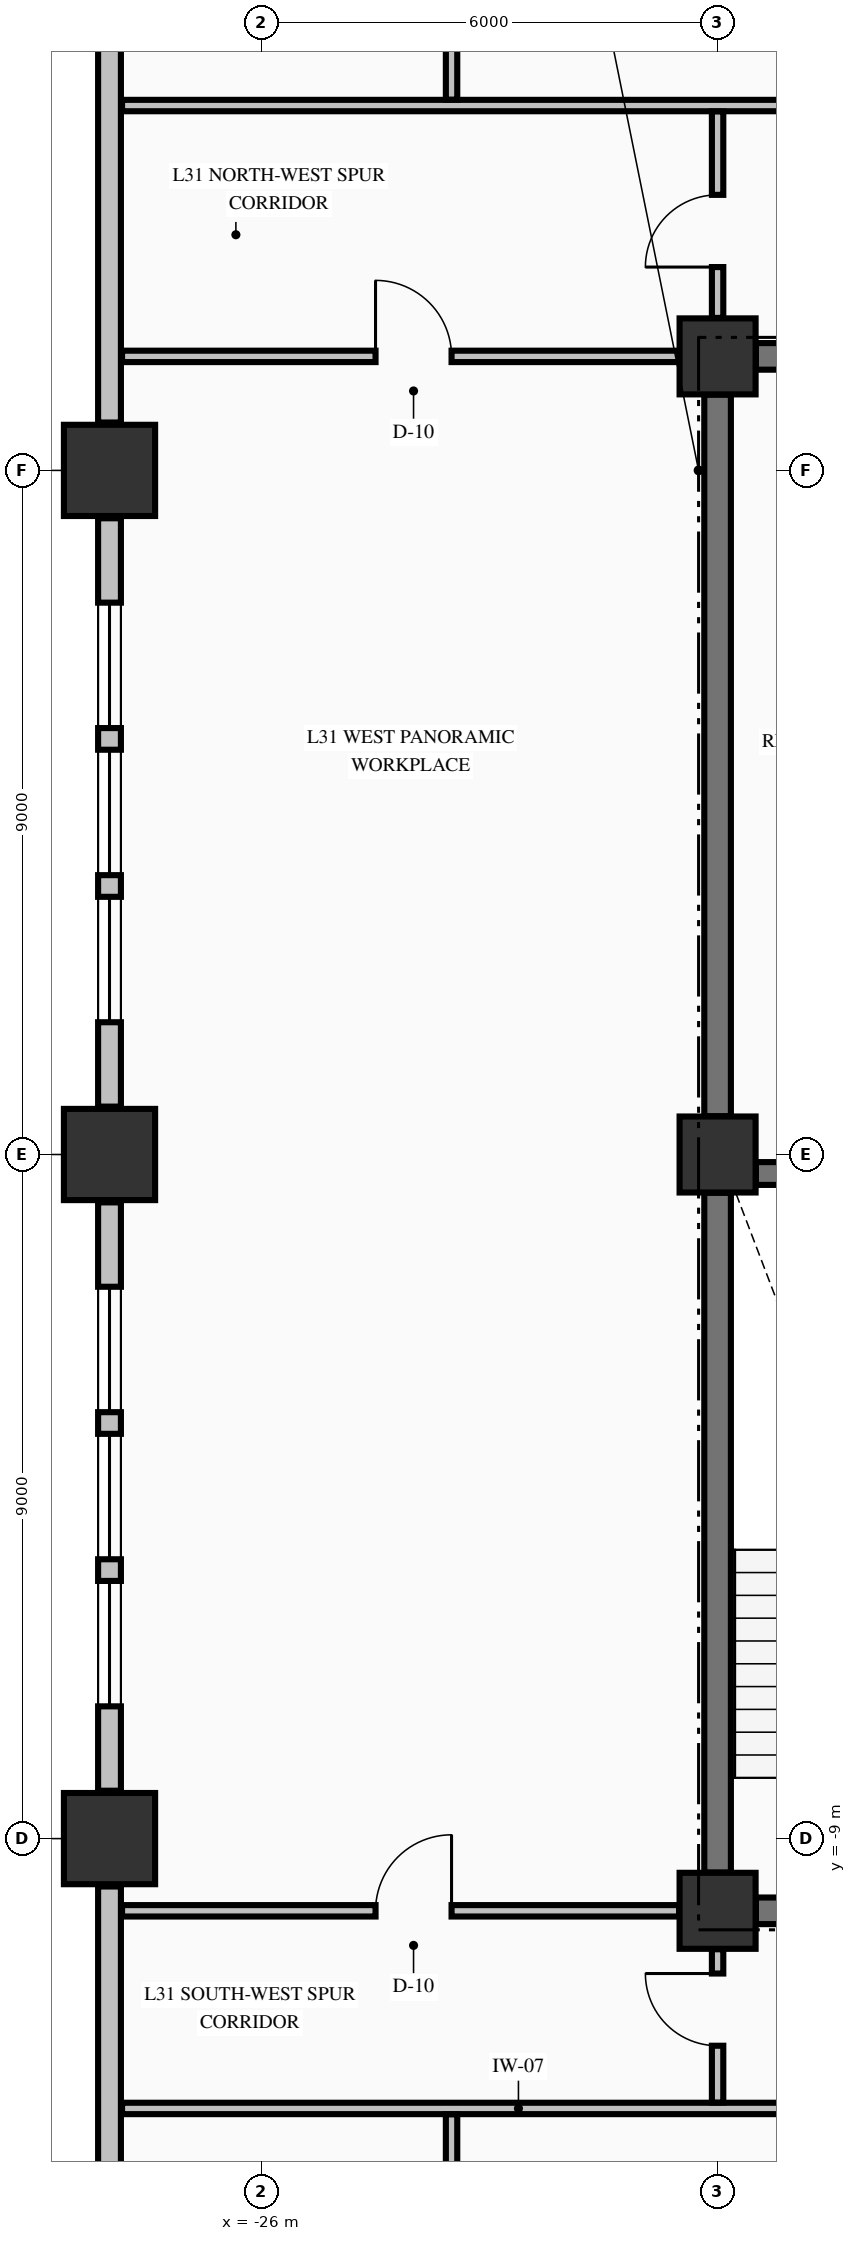
"""IFC4 building model, lengths in metres.
Left out: names, types, materials, properties, quantities, classifications, styles, units other than length and angle.
Written with IfcOpenShell. Run it as: python <this file> out.ifc"""

import sys

from ifc_helpers import new_model, si_unit, direction, frame, frame_2d, origin, origin_2d, place, context, subcontext, project, spatial, rectangle, extrude, element, fill, save


model = new_model("IFC4")
c1 = context("Model", 3, precision=1e-05, world=origin(), true_north=direction((0.0, 1.0)))
c2 = subcontext(c1, "Body", "Model", "MODEL_VIEW")
j1 = project(units=[si_unit("LENGTHUNIT", "METRE"), si_unit("PLANEANGLEUNIT", "RADIAN")], contexts=[c1])
p1 = place(None, origin())
s1 = spatial("IfcSite", under=j1, at=p1, CompositionType="ELEMENT")
p2 = place(p1, origin())
s2 = spatial("IfcBuilding", under=s1, at=p2, CompositionType="ELEMENT")
p3 = place(p2, frame((0.0, 0.0, 124.92)))
s3 = spatial("IfcBuildingStorey", under=s2, at=p3, CompositionType="ELEMENT", Elevation=124.92)
for number, where, z_axis, x_axis in (
    (1, (-28.0, -9.0, -0.25), (0.0, 0.0, 1.0), (1.0, 0.0, 0.0)),
    (2, (-28.0, 0.0, -0.25), (0.0, 0.0, 1.0), (1.0, 0.0, 0.0)),
    (3, (-28.0, 9.0, -0.25), (0.0, 0.0, 1.0), (1.0, 0.0, 0.0)),
):
    element("IfcColumn", number, at=place(p3, frame(where, z_axis=z_axis, x_axis=x_axis)), inside=s3, PredefinedType="COLUMN", context=c2, shape_type="SweptSolid", body=[
        extrude(rectangle(XDim=1.2, YDim=1.2, at=origin_2d()), origin(), (0.0, 0.0, 1.0), 3.57),
    ])
for number, where, z_axis, x_axis in (
    (4, (-20.0, -9.95, -0.25), (0.0, 0.0, 1.0), (1.0, 0.0, 0.0)),
    (5, (-20.0, 10.5, -0.25), (0.0, 0.0, 1.0), (1.0, 0.0, 0.0)),
    (6, (-20.0, 0.0, -0.25), (0.0, 0.0, 1.0), (1.0, 0.0, 0.0)),
):
    element("IfcColumn", number, at=place(p3, frame(where, z_axis=z_axis, x_axis=x_axis)), inside=s3, PredefinedType="COLUMN", context=c2, shape_type="SweptSolid", body=[
        extrude(rectangle(XDim=1.0, YDim=1.0, at=origin_2d()), origin(), (0.0, 0.0, 1.0), 3.57),
    ])
p4 = place(p3, frame((-28.0, -9.63, 0.0), z_axis=(0.0, 0.0, 1.0), x_axis=(0.0, -1.0, 0.0)))
e7 = element("IfcWall", 7, at=p4, inside=s3, PredefinedType="STANDARD", context=c2, shape_type="SweptSolid", body=[
    extrude(rectangle(XDim=10.74, YDim=0.3, at=frame_2d((5.37, 0.0))), origin(), (0.0, 0.0, 1.0), 2.712),
])
p5 = place(p3, frame((-28.0, -0.63, 0.0), z_axis=(0.0, 0.0, 1.0), x_axis=(0.0, -1.0, 0.0)))
e8 = element("IfcWall", 8, at=p5, inside=s3, PredefinedType="STANDARD", context=c2, shape_type="SweptSolid", body=[
    extrude(rectangle(XDim=7.74, YDim=0.3, at=frame_2d((3.87, 0.0))), origin(), (0.0, 0.0, 1.0), 2.712),
])
p6 = place(p5, frame((1.11, 0.0, 0.8)))
e9 = element("IfcOpeningElement", 9, at=p6, cuts=e8, PredefinedType="OPENING", context=c2, shape_type="SweptSolid", body=[
    extrude(rectangle(XDim=1.65, YDim=1.7, at=frame_2d((0.825, 0.85))), frame((0.0, 0.16, 0.0), z_axis=(0.0, -1.0, 0.0), x_axis=(1.0, 0.0, 0.0)), (0.0, 0.0, 1.0), 0.32),
])
p7 = place(p5, frame((3.045, 0.0, 0.8)))
e10 = element("IfcOpeningElement", 10, at=p7, cuts=e8, PredefinedType="OPENING", context=c2, shape_type="SweptSolid", body=[
    extrude(rectangle(XDim=1.65, YDim=1.7, at=frame_2d((0.825, 0.85))), frame((0.0, 0.16, 0.0), z_axis=(0.0, -1.0, 0.0), x_axis=(1.0, 0.0, 0.0)), (0.0, 0.0, 1.0), 0.32),
])
p8 = place(p5, frame((4.98, 0.0, 0.8)))
e11 = element("IfcOpeningElement", 11, at=p8, cuts=e8, PredefinedType="OPENING", context=c2, shape_type="SweptSolid", body=[
    extrude(rectangle(XDim=1.65, YDim=1.7, at=frame_2d((0.825, 0.85))), frame((0.0, 0.16, 0.0), z_axis=(0.0, -1.0, 0.0), x_axis=(1.0, 0.0, 0.0)), (0.0, 0.0, 1.0), 0.32),
])
p9 = place(p3, frame((-28.0, 8.37, 0.0), z_axis=(0.0, 0.0, 1.0), x_axis=(0.0, -1.0, 0.0)))
e12 = element("IfcWall", 12, at=p9, inside=s3, PredefinedType="STANDARD", context=c2, shape_type="SweptSolid", body=[
    extrude(rectangle(XDim=7.74, YDim=0.3, at=frame_2d((3.87, 0.0))), origin(), (0.0, 0.0, 1.0), 2.712),
])
p10 = place(p9, frame((1.11, 0.0, 0.8)))
e13 = element("IfcOpeningElement", 13, at=p10, cuts=e12, PredefinedType="OPENING", context=c2, shape_type="SweptSolid", body=[
    extrude(rectangle(XDim=1.65, YDim=1.7, at=frame_2d((0.825, 0.85))), frame((0.0, 0.16, 0.0), z_axis=(0.0, -1.0, 0.0), x_axis=(1.0, 0.0, 0.0)), (0.0, 0.0, 1.0), 0.32),
])
p11 = place(p9, frame((3.045, 0.0, 0.8)))
e14 = element("IfcOpeningElement", 14, at=p11, cuts=e12, PredefinedType="OPENING", context=c2, shape_type="SweptSolid", body=[
    extrude(rectangle(XDim=1.65, YDim=1.7, at=frame_2d((0.825, 0.85))), frame((0.0, 0.16, 0.0), z_axis=(0.0, -1.0, 0.0), x_axis=(1.0, 0.0, 0.0)), (0.0, 0.0, 1.0), 0.32),
])
p12 = place(p9, frame((4.98, 0.0, 0.8)))
e15 = element("IfcOpeningElement", 15, at=p12, cuts=e12, PredefinedType="OPENING", context=c2, shape_type="SweptSolid", body=[
    extrude(rectangle(XDim=1.65, YDim=1.7, at=frame_2d((0.825, 0.85))), frame((0.0, 0.16, 0.0), z_axis=(0.0, -1.0, 0.0), x_axis=(1.0, 0.0, 0.0)), (0.0, 0.0, 1.0), 0.32),
])
p13 = place(p3, frame((-28.0, 20.37, 0.0), z_axis=(0.0, 0.0, 1.0), x_axis=(0.0, -1.0, 0.0)))
e16 = element("IfcWall", 16, at=p13, inside=s3, PredefinedType="STANDARD", context=c2, shape_type="SweptSolid", body=[
    extrude(rectangle(XDim=10.74, YDim=0.3, at=frame_2d((5.37, 0.0))), origin(), (0.0, 0.0, 1.0), 2.712),
])
p14 = place(p3, frame((-19.496, -9.95, 0.0), z_axis=(0.0, 0.0, 1.0), x_axis=(1.0, 0.0, 0.0)))
e17 = element("IfcWall", 17, at=p14, inside=s3, PredefinedType="SHEAR", context=c2, shape_type="SweptSolid", body=[
    extrude(rectangle(XDim=4.796, YDim=0.35, at=frame_2d((2.398, 0.0))), origin(), (0.0, 0.0, 1.0), 3.32),
])
p15 = place(p14, frame((0.671, 0.0, 0.0)))
e18 = element("IfcOpeningElement", 18, at=p15, cuts=e17, PredefinedType="OPENING", context=c2, shape_type="SweptSolid", body=[
    extrude(rectangle(XDim=1.05, YDim=2.15, at=frame_2d((0.525, 1.075))), frame((0.0, 0.185, 0.0), z_axis=(0.0, -1.0, 0.0), x_axis=(1.0, 0.0, 0.0)), (0.0, 0.0, 1.0), 0.37),
])
p16 = place(p3, frame((-19.496, -0.25, 0.0), z_axis=(0.0, 0.0, 1.0), x_axis=(1.0, 0.0, 0.0)))
e19 = element("IfcWall", 19, at=p16, inside=s3, PredefinedType="SHEAR", context=c2, shape_type="SweptSolid", body=[
    extrude(rectangle(XDim=7.992, YDim=0.3, at=frame_2d((3.996, 0.0))), origin(), (0.0, 0.0, 1.0), 3.32),
])
p17 = place(p16, frame((5.796, 0.0, 0.0)))
e20 = element("IfcOpeningElement", 20, at=p17, cuts=e19, PredefinedType="OPENING", context=c2, shape_type="SweptSolid", body=[
    extrude(rectangle(XDim=1.1, YDim=2.15, at=frame_2d((0.55, 1.075))), frame((0.0, 0.16, 0.0), z_axis=(0.0, -1.0, 0.0), x_axis=(1.0, 0.0, 0.0)), (0.0, 0.0, 1.0), 0.32),
])
p18 = place(p3, frame((-19.496, 10.5, 0.0), z_axis=(0.0, 0.0, 1.0), x_axis=(1.0, 0.0, 0.0)))
e21 = element("IfcWall", 21, at=p18, inside=s3, PredefinedType="SHEAR", context=c2, shape_type="SweptSolid", body=[
    extrude(rectangle(XDim=4.796, YDim=0.35, at=frame_2d((2.398, 0.0))), origin(), (0.0, 0.0, 1.0), 3.32),
])
p19 = place(p18, frame((0.496, 0.0, 0.0)))
e22 = element("IfcOpeningElement", 22, at=p19, cuts=e21, PredefinedType="OPENING", context=c2, shape_type="SweptSolid", body=[
    extrude(rectangle(XDim=0.9, YDim=2.15, at=frame_2d((0.45, 1.075))), frame((0.0, 0.185, 0.0), z_axis=(0.0, -1.0, 0.0), x_axis=(1.0, 0.0, 0.0)), (0.0, 0.0, 1.0), 0.37),
])
p20 = place(p18, frame((3.046, 0.0, 0.0)))
e23 = element("IfcOpeningElement", 23, at=p20, cuts=e21, PredefinedType="OPENING", context=c2, shape_type="SweptSolid", body=[
    extrude(rectangle(XDim=0.9, YDim=2.15, at=frame_2d((0.45, 1.075))), frame((0.0, 0.185, 0.0), z_axis=(0.0, -1.0, 0.0), x_axis=(1.0, 0.0, 0.0)), (0.0, 0.0, 1.0), 0.37),
])
p21 = place(p3, frame((-27.835, -12.55, 0.0), z_axis=(0.0, 0.0, 1.0), x_axis=(1.0, 0.0, 0.0)))
e24 = element("IfcWall", 24, at=p21, inside=s3, PredefinedType="PARTITIONING", context=c2, shape_type="SweptSolid", body=[
    extrude(rectangle(XDim=50.67, YDim=0.15, at=frame_2d((25.335, 0.0))), origin(), (0.0, 0.0, 1.0), 3.32),
])
p22 = place(p21, frame((10.43, 0.0, 0.0)))
e25 = element("IfcOpeningElement", 25, at=p22, cuts=e24, PredefinedType="OPENING", context=c2, shape_type="SweptSolid", body=[
    extrude(rectangle(XDim=1.05, YDim=2.15, at=frame_2d((0.525, 1.075))), frame((0.0, 0.085, 0.0), z_axis=(0.0, -1.0, 0.0), x_axis=(1.0, 0.0, 0.0)), (0.0, 0.0, 1.0), 0.17),
])
p23 = place(p21, frame((15.06, 0.0, 0.0)))
e26 = element("IfcOpeningElement", 26, at=p23, cuts=e24, PredefinedType="OPENING", context=c2, shape_type="SweptSolid", body=[
    extrude(rectangle(XDim=0.95, YDim=2.15, at=frame_2d((0.475, 1.075))), frame((0.0, 0.085, 0.0), z_axis=(0.0, -1.0, 0.0), x_axis=(1.0, 0.0, 0.0)), (0.0, 0.0, 1.0), 0.17),
])
p24 = place(p21, frame((24.96, 0.0, 0.0)))
e27 = element("IfcOpeningElement", 27, at=p24, cuts=e24, PredefinedType="OPENING", context=c2, shape_type="SweptSolid", body=[
    extrude(rectangle(XDim=1.05, YDim=2.15, at=frame_2d((0.525, 1.075))), frame((0.0, 0.085, 0.0), z_axis=(0.0, -1.0, 0.0), x_axis=(1.0, 0.0, 0.0)), (0.0, 0.0, 1.0), 0.17),
])
p25 = place(p21, frame((33.01, 0.0, 0.0)))
e28 = element("IfcOpeningElement", 28, at=p25, cuts=e24, PredefinedType="OPENING", context=c2, shape_type="SweptSolid", body=[
    extrude(rectangle(XDim=0.95, YDim=2.15, at=frame_2d((0.475, 1.075))), frame((0.0, 0.085, 0.0), z_axis=(0.0, -1.0, 0.0), x_axis=(1.0, 0.0, 0.0)), (0.0, 0.0, 1.0), 0.17),
])
p26 = place(p21, frame((41.09, 0.0, 0.0)))
e29 = element("IfcOpeningElement", 29, at=p26, cuts=e24, PredefinedType="OPENING", context=c2, shape_type="SweptSolid", body=[
    extrude(rectangle(XDim=1.05, YDim=2.15, at=frame_2d((0.525, 1.075))), frame((0.0, 0.085, 0.0), z_axis=(0.0, -1.0, 0.0), x_axis=(1.0, 0.0, 0.0)), (0.0, 0.0, 1.0), 0.17),
])
p27 = place(p3, frame((-27.835, -9.95, 0.0), z_axis=(0.0, 0.0, 1.0), x_axis=(1.0, 0.0, 0.0)))
e30 = element("IfcWall", 30, at=p27, inside=s3, PredefinedType="PARTITIONING", context=c2, shape_type="SweptSolid", body=[
    extrude(rectangle(XDim=7.329, YDim=0.15, at=frame_2d((3.665, 0.0))), origin(), (0.0, 0.0, 1.0), 3.32),
])
p28 = place(p27, frame((3.335, 0.0, 0.0)))
e31 = element("IfcOpeningElement", 31, at=p28, cuts=e30, PredefinedType="OPENING", context=c2, shape_type="SweptSolid", body=[
    extrude(rectangle(XDim=1.0, YDim=2.15, at=frame_2d((0.5, 1.075))), frame((0.0, 0.085, 0.0), z_axis=(0.0, -1.0, 0.0), x_axis=(1.0, 0.0, 0.0)), (0.0, 0.0, 1.0), 0.17),
])
p29 = place(p3, frame((-27.835, 10.5, 0.0), z_axis=(0.0, 0.0, 1.0), x_axis=(1.0, 0.0, 0.0)))
e32 = element("IfcWall", 32, at=p29, inside=s3, PredefinedType="PARTITIONING", context=c2, shape_type="SweptSolid", body=[
    extrude(rectangle(XDim=7.329, YDim=0.15, at=frame_2d((3.665, 0.0))), origin(), (0.0, 0.0, 1.0), 3.32),
])
p30 = place(p29, frame((3.335, 0.0, 0.0)))
e33 = element("IfcOpeningElement", 33, at=p30, cuts=e32, PredefinedType="OPENING", context=c2, shape_type="SweptSolid", body=[
    extrude(rectangle(XDim=1.0, YDim=2.15, at=frame_2d((0.5, 1.075))), frame((0.0, 0.085, 0.0), z_axis=(0.0, -1.0, 0.0), x_axis=(1.0, 0.0, 0.0)), (0.0, 0.0, 1.0), 0.17),
])
p31 = place(p3, frame((-27.835, 13.8, 0.0), z_axis=(0.0, 0.0, 1.0), x_axis=(1.0, 0.0, 0.0)))
e34 = element("IfcWall", 34, at=p31, inside=s3, PredefinedType="PARTITIONING", context=c2, shape_type="SweptSolid", body=[
    extrude(rectangle(XDim=50.67, YDim=0.15, at=frame_2d((25.335, 0.0))), origin(), (0.0, 0.0, 1.0), 3.32),
])
p32 = place(p31, frame((13.31, 0.0, 0.0)))
e35 = element("IfcOpeningElement", 35, at=p32, cuts=e34, PredefinedType="OPENING", context=c2, shape_type="SweptSolid", body=[
    extrude(rectangle(XDim=1.05, YDim=2.15, at=frame_2d((0.525, 1.075))), frame((0.0, 0.085, 0.0), z_axis=(0.0, -1.0, 0.0), x_axis=(1.0, 0.0, 0.0)), (0.0, 0.0, 1.0), 0.17),
])
p33 = place(p31, frame((25.61, 0.0, 0.0)))
e36 = element("IfcOpeningElement", 36, at=p33, cuts=e34, PredefinedType="OPENING", context=c2, shape_type="SweptSolid", body=[
    extrude(rectangle(XDim=1.05, YDim=2.15, at=frame_2d((0.525, 1.075))), frame((0.0, 0.085, 0.0), z_axis=(0.0, -1.0, 0.0), x_axis=(1.0, 0.0, 0.0)), (0.0, 0.0, 1.0), 0.17),
])
p34 = place(p31, frame((33.76, 0.0, 0.0)))
e37 = element("IfcOpeningElement", 37, at=p34, cuts=e34, PredefinedType="OPENING", context=c2, shape_type="SweptSolid", body=[
    extrude(rectangle(XDim=1.05, YDim=2.15, at=frame_2d((0.525, 1.075))), frame((0.0, 0.085, 0.0), z_axis=(0.0, -1.0, 0.0), x_axis=(1.0, 0.0, 0.0)), (0.0, 0.0, 1.0), 0.17),
])
p35 = place(p3, frame((-20.0, -9.446, 0.0), z_axis=(0.0, 0.0, 1.0), x_axis=(0.0, 1.0, 0.0)))
e38 = element("IfcWall", 38, at=p35, inside=s3, PredefinedType="SHEAR", context=c2, shape_type="SweptSolid", body=[
    extrude(rectangle(XDim=8.942, YDim=0.35, at=frame_2d((4.471, 0.0))), origin(), (0.0, 0.0, 1.0), 3.32),
])
p36 = place(p3, frame((-20.0, 0.504, 0.0), z_axis=(0.0, 0.0, 1.0), x_axis=(0.0, 1.0, 0.0)))
e39 = element("IfcWall", 39, at=p36, inside=s3, PredefinedType="SHEAR", context=c2, shape_type="SweptSolid", body=[
    extrude(rectangle(XDim=9.492, YDim=0.35, at=frame_2d((4.746, 0.0))), origin(), (0.0, 0.0, 1.0), 3.32),
])
p37 = place(p3, frame((-23.5, -20.394, 0.0), z_axis=(0.0, 0.0, 1.0), x_axis=(0.0, 1.0, 0.0)))
e40 = element("IfcWall", 40, at=p37, inside=s3, PredefinedType="PARTITIONING", context=c2, shape_type="SweptSolid", body=[
    extrude(rectangle(XDim=7.766, YDim=0.15, at=frame_2d((3.883, 0.0))), origin(), (0.0, 0.0, 1.0), 3.32),
])
p38 = place(p3, frame((-23.5, 13.878, 0.0), z_axis=(0.0, 0.0, 1.0), x_axis=(0.0, 1.0, 0.0)))
e41 = element("IfcWall", 41, at=p38, inside=s3, PredefinedType="PARTITIONING", context=c2, shape_type="SweptSolid", body=[
    extrude(rectangle(XDim=6.516, YDim=0.15, at=frame_2d((3.258, 0.0))), origin(), (0.0, 0.0, 1.0), 3.32),
])
p39 = place(p3, frame((-20.0, -12.472, 0.0), z_axis=(0.0, 0.0, 1.0), x_axis=(0.0, 1.0, 0.0)))
e42 = element("IfcWall", 42, at=p39, inside=s3, PredefinedType="PARTITIONING", context=c2, shape_type="SweptSolid", body=[
    extrude(rectangle(XDim=2.016, YDim=0.15, at=frame_2d((1.008, 0.0))), origin(), (0.0, 0.0, 1.0), 2.81),
])
p40 = place(p39, frame((0.747, 0.0, 0.0)))
e43 = element("IfcOpeningElement", 43, at=p40, cuts=e42, PredefinedType="OPENING", context=c2, shape_type="SweptSolid", body=[
    extrude(rectangle(XDim=0.95, YDim=2.15, at=frame_2d((0.475, 1.075))), frame((0.0, 0.085, 0.0), z_axis=(0.0, -1.0, 0.0), x_axis=(1.0, 0.0, 0.0)), (0.0, 0.0, 1.0), 0.17),
])
p41 = place(p3, frame((-20.0, 11.006, 0.0), z_axis=(0.0, 0.0, 1.0), x_axis=(0.0, 1.0, 0.0)))
e44 = element("IfcWall", 44, at=p41, inside=s3, PredefinedType="PARTITIONING", context=c2, shape_type="SweptSolid", body=[
    extrude(rectangle(XDim=2.716, YDim=0.15, at=frame_2d((1.358, 0.0))), origin(), (0.0, 0.0, 1.0), 2.81),
])
p42 = place(p41, frame((0.669, 0.0, 0.0)))
e45 = element("IfcOpeningElement", 45, at=p42, cuts=e44, PredefinedType="OPENING", context=c2, shape_type="SweptSolid", body=[
    extrude(rectangle(XDim=0.95, YDim=2.15, at=frame_2d((0.475, 1.075))), frame((0.0, 0.085, 0.0), z_axis=(0.0, -1.0, 0.0), x_axis=(1.0, 0.0, 0.0)), (0.0, 0.0, 1.0), 0.17),
])
p43 = place(p6, origin())
e46 = element("IfcWindow", 46, at=p43, inside=s3, PartitioningType="SINGLE_PANEL", PredefinedType="WINDOW", context=c2, shape_type="SweptSolid", body=[
    extrude(rectangle(XDim=1.65, YDim=1.7, at=frame_2d((0.825, 0.85))), frame((0.0, 0.03, 0.0), z_axis=(0.0, -1.0, 0.0), x_axis=(1.0, 0.0, 0.0)), (0.0, 0.0, 1.0), 0.06),
])
fill(e9, e46)
p44 = place(p7, origin())
e47 = element("IfcWindow", 47, at=p44, inside=s3, PartitioningType="SINGLE_PANEL", PredefinedType="WINDOW", context=c2, shape_type="SweptSolid", body=[
    extrude(rectangle(XDim=1.65, YDim=1.7, at=frame_2d((0.825, 0.85))), frame((0.0, 0.03, 0.0), z_axis=(0.0, -1.0, 0.0), x_axis=(1.0, 0.0, 0.0)), (0.0, 0.0, 1.0), 0.06),
])
fill(e10, e47)
p45 = place(p8, origin())
e48 = element("IfcWindow", 48, at=p45, inside=s3, PartitioningType="SINGLE_PANEL", PredefinedType="WINDOW", context=c2, shape_type="SweptSolid", body=[
    extrude(rectangle(XDim=1.65, YDim=1.7, at=frame_2d((0.825, 0.85))), frame((0.0, 0.03, 0.0), z_axis=(0.0, -1.0, 0.0), x_axis=(1.0, 0.0, 0.0)), (0.0, 0.0, 1.0), 0.06),
])
fill(e11, e48)
p46 = place(p10, origin())
e49 = element("IfcWindow", 49, at=p46, inside=s3, PartitioningType="SINGLE_PANEL", PredefinedType="WINDOW", context=c2, shape_type="SweptSolid", body=[
    extrude(rectangle(XDim=1.65, YDim=1.7, at=frame_2d((0.825, 0.85))), frame((0.0, 0.03, 0.0), z_axis=(0.0, -1.0, 0.0), x_axis=(1.0, 0.0, 0.0)), (0.0, 0.0, 1.0), 0.06),
])
fill(e13, e49)
p47 = place(p11, origin())
e50 = element("IfcWindow", 50, at=p47, inside=s3, PartitioningType="SINGLE_PANEL", PredefinedType="WINDOW", context=c2, shape_type="SweptSolid", body=[
    extrude(rectangle(XDim=1.65, YDim=1.7, at=frame_2d((0.825, 0.85))), frame((0.0, 0.03, 0.0), z_axis=(0.0, -1.0, 0.0), x_axis=(1.0, 0.0, 0.0)), (0.0, 0.0, 1.0), 0.06),
])
fill(e14, e50)
p48 = place(p12, origin())
e51 = element("IfcWindow", 51, at=p48, inside=s3, PartitioningType="SINGLE_PANEL", PredefinedType="WINDOW", context=c2, shape_type="SweptSolid", body=[
    extrude(rectangle(XDim=1.65, YDim=1.7, at=frame_2d((0.825, 0.85))), frame((0.0, 0.03, 0.0), z_axis=(0.0, -1.0, 0.0), x_axis=(1.0, 0.0, 0.0)), (0.0, 0.0, 1.0), 0.06),
])
fill(e15, e51)
p49 = place(p42, origin())
e52 = element("IfcDoor", 52, at=p49, inside=s3, OperationType="SINGLE_SWING_LEFT", PredefinedType="DOOR", context=c2, shape_type="SweptSolid", body=[
    extrude(rectangle(XDim=0.95, YDim=2.15, at=frame_2d((0.475, 1.075))), frame((0.0, 0.025, 0.0), z_axis=(0.0, -1.0, 0.0), x_axis=(1.0, 0.0, 0.0)), (0.0, 0.0, 1.0), 0.05),
])
fill(e45, e52)
p50 = place(p40, origin())
e53 = element("IfcDoor", 53, at=p50, inside=s3, OperationType="SINGLE_SWING_RIGHT", PredefinedType="DOOR", context=c2, shape_type="SweptSolid", body=[
    extrude(rectangle(XDim=0.95, YDim=2.15, at=frame_2d((0.475, 1.075))), frame((0.0, 0.025, 0.0), z_axis=(0.0, -1.0, 0.0), x_axis=(1.0, 0.0, 0.0)), (0.0, 0.0, 1.0), 0.05),
])
fill(e43, e53)
p51 = place(p30, origin())
e54 = element("IfcDoor", 54, at=p51, inside=s3, OperationType="SINGLE_SWING_LEFT", PredefinedType="DOOR", context=c2, shape_type="SweptSolid", body=[
    extrude(rectangle(XDim=1.0, YDim=2.15, at=frame_2d((0.5, 1.075))), frame((0.0, 0.025, 0.0), z_axis=(0.0, -1.0, 0.0), x_axis=(1.0, 0.0, 0.0)), (0.0, 0.0, 1.0), 0.05),
])
fill(e33, e54)
p52 = place(p28, origin())
e55 = element("IfcDoor", 55, at=p52, inside=s3, OperationType="SINGLE_SWING_RIGHT", PredefinedType="DOOR", context=c2, shape_type="SweptSolid", body=[
    extrude(rectangle(XDim=1.0, YDim=2.15, at=frame_2d((0.5, 1.075))), frame((0.0, 0.025, 0.0), z_axis=(0.0, -1.0, 0.0), x_axis=(1.0, 0.0, 0.0)), (0.0, 0.0, 1.0), 0.05),
])
fill(e31, e55)
save(model, sys.argv[1])
